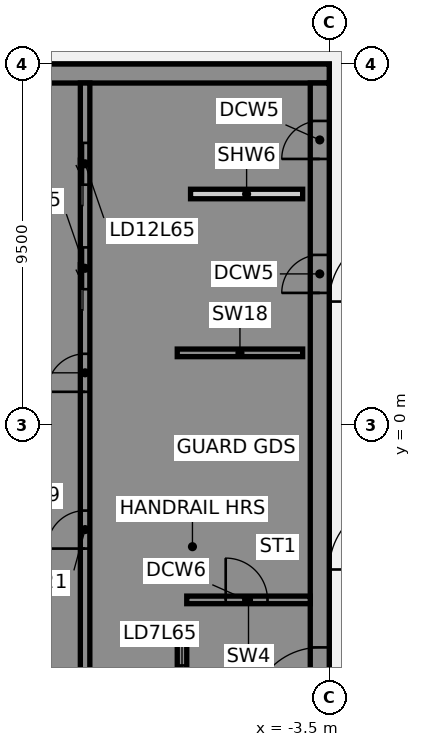
"""IFC4 building model, lengths in metres.
Left out: names, types, materials, properties, quantities, classifications, styles, units other than length and angle.
Written with IfcOpenShell. Run it as: python <this file> out.ifc"""

import sys

from ifc_helpers import new_model, si_unit, direction, frame, frame_2d, origin, place, context, subcontext, project, spatial, polyline, rectangle, outline, extrude, element, fill, save


model = new_model("IFC4")
c1 = context("Model", 3, precision=1e-05, world=origin(), true_north=direction((0.0, 1.0)))
c2 = subcontext(c1, "Body", "Model", "MODEL_VIEW")
j1 = project(units=[si_unit("LENGTHUNIT", "METRE"), si_unit("PLANEANGLEUNIT", "RADIAN")], contexts=[c1])
p1 = place(None, origin())
s1 = spatial("IfcSite", under=j1, at=p1, CompositionType="ELEMENT")
p2 = place(p1, origin())
s2 = spatial("IfcBuilding", under=s1, at=p2, CompositionType="ELEMENT")
p3 = place(p2, frame((0.0, 0.0, 256.8)))
s3 = spatial("IfcBuildingStorey", under=s2, at=p3, CompositionType="ELEMENT", Elevation=256.8)
p4 = place(p3, frame((-16.5, 9.25, 0.0), z_axis=(0.0, 0.0, 1.0), x_axis=(1.0, 0.0, 0.0)))
e1 = element("IfcWall", 1, at=p4, inside=s3, PredefinedType="SHEAR", context=c2, shape_type="SweptSolid", body=[
    extrude(rectangle(XDim=13.0, YDim=0.5, at=frame_2d((6.5, 0.0))), origin(), (0.0, 0.0, 1.0), 3.46),
])
p5 = place(p3, origin())
e2 = element("IfcWall", 2, at=p5, inside=s3, PredefinedType="SHEAR", context=c2, shape_type="SweptSolid", body=[
    extrude(outline(polyline([(-9.8, -5.375), (-9.8, -5.625), (-7.5, -5.625), (-7.25, -5.625), (-7.25, 9.0), (-7.5, 9.0), (-9.8, 9.0), (-9.8, 8.125), (-7.5, 8.125), (-7.5, 5.625), (-9.8, 5.625), (-9.8, 5.375), (-7.5, 5.375), (-7.5, 2.875), (-9.8, 2.875), (-9.8, 2.625), (-7.5, 2.625), (-7.5, -5.375), (-9.8, -5.375)])), origin(), (0.0, 0.0, 1.0), 3.46),
])
p6 = place(p3, origin())
e3 = element("IfcWall", 3, at=p6, inside=s3, PredefinedType="SHEAR", context=c2, shape_type="SweptSolid", body=[
    extrude(outline(polyline([(-7.5, -8.125), (-9.55, -8.125), (-9.55, -5.625), (-9.8, -5.625), (-9.8, -8.125), (-9.8, -9.0), (-7.5, -9.0), (-7.5, -8.125)])), origin(), (0.0, 0.0, 1.0), 3.46),
])
p7 = place(p3, frame((-7.5, 1.9, 0.0), z_axis=(0.0, 0.0, 1.0), x_axis=(1.0, 0.0, 0.0)))
e4 = element("IfcWall", 4, at=p7, inside=s3, PredefinedType="SHEAR", context=c2, shape_type="SweptSolid", body=[
    extrude(rectangle(XDim=3.3, YDim=0.2, at=frame_2d((1.65, 0.0))), origin(), (0.0, 0.0, 1.0), 3.46),
])
p8 = place(p3, frame((-9.925, -9.0, 0.0), z_axis=(0.0, 0.0, 1.0), x_axis=(0.0, 1.0, 0.0)))
e5 = element("IfcWall", 5, at=p8, inside=s3, PredefinedType="SHEAR", context=c2, shape_type="SweptSolid", body=[
    extrude(rectangle(XDim=18.0, YDim=0.25, at=frame_2d((9.0, 0.0))), origin(), (0.0, 0.0, 1.0), 3.46),
])
p9 = place(p8, frame((12.575, 0.0, 0.0)))
e6 = element("IfcOpeningElement", 6, at=p9, cuts=e5, PredefinedType="OPENING", context=c2, shape_type="SweptSolid", body=[
    extrude(rectangle(XDim=1.1, YDim=2.1, at=frame_2d((0.55, 1.05))), frame((0.0, 0.135, 0.0), z_axis=(0.0, -1.0, 0.0), x_axis=(1.0, 0.0, 0.0)), (0.0, 0.0, 1.0), 0.27),
])
p10 = place(p8, frame((15.325, 0.0, 0.0)))
e7 = element("IfcOpeningElement", 7, at=p10, cuts=e5, PredefinedType="OPENING", context=c2, shape_type="SweptSolid", body=[
    extrude(rectangle(XDim=1.1, YDim=2.1, at=frame_2d((0.55, 1.05))), frame((0.0, 0.135, 0.0), z_axis=(0.0, -1.0, 0.0), x_axis=(1.0, 0.0, 0.0)), (0.0, 0.0, 1.0), 0.27),
])
p11 = place(p8, frame((5.75, 0.0, 0.0)))
e8 = element("IfcOpeningElement", 8, at=p11, cuts=e5, PredefinedType="OPENING", context=c2, shape_type="SweptSolid", body=[
    extrude(rectangle(XDim=1.0, YDim=2.1, at=frame_2d((0.5, 1.05))), frame((0.0, 0.135, 0.0), z_axis=(0.0, -1.0, 0.0), x_axis=(1.0, 0.0, 0.0)), (0.0, 0.0, 1.0), 0.27),
])
p12 = place(p8, frame((9.875, 0.0, 0.0)))
e9 = element("IfcOpeningElement", 9, at=p12, cuts=e5, PredefinedType="OPENING", context=c2, shape_type="SweptSolid", body=[
    extrude(rectangle(XDim=1.0, YDim=2.1, at=frame_2d((0.5, 1.05))), frame((0.0, 0.135, 0.0), z_axis=(0.0, -1.0, 0.0), x_axis=(1.0, 0.0, 0.0)), (0.0, 0.0, 1.0), 0.27),
])
p13 = place(p3, frame((-7.375, -8.125, 0.0), z_axis=(0.0, 0.0, 1.0), x_axis=(0.0, 1.0, 0.0)))
e10 = element("IfcWall", 10, at=p13, inside=s3, PredefinedType="SHEAR", context=c2, shape_type="SweptSolid", body=[
    extrude(rectangle(XDim=2.5, YDim=0.25, at=frame_2d((1.25, 0.0))), origin(), (0.0, 0.0, 1.0), 3.46),
])
p14 = place(p13, frame((0.7, 0.0, 0.0)))
e11 = element("IfcOpeningElement", 11, at=p14, cuts=e10, PredefinedType="OPENING", context=c2, shape_type="SweptSolid", body=[
    extrude(rectangle(XDim=1.1, YDim=2.1, at=frame_2d((0.55, 1.05))), frame((0.0, 0.135, 0.0), z_axis=(0.0, -1.0, 0.0), x_axis=(1.0, 0.0, 0.0)), (0.0, 0.0, 1.0), 0.27),
])
p15 = place(p3, frame((-3.75, -9.0, 0.0), z_axis=(0.0, 0.0, 1.0), x_axis=(0.0, 1.0, 0.0)))
e12 = element("IfcWall", 12, at=p15, inside=s3, PredefinedType="SHEAR", context=c2, shape_type="SweptSolid", body=[
    extrude(rectangle(XDim=18.0, YDim=0.5, at=frame_2d((9.0, 0.0))), origin(), (0.0, 0.0, 1.0), 3.46),
])
p16 = place(p15, frame((1.35, 0.0, 0.0)))
e13 = element("IfcOpeningElement", 13, at=p16, cuts=e12, PredefinedType="OPENING", context=c2, shape_type="SweptSolid", body=[
    extrude(rectangle(XDim=1.8, YDim=2.1, at=frame_2d((0.9, 1.05))), frame((0.0, 0.26, 0.0), z_axis=(0.0, -1.0, 0.0), x_axis=(1.0, 0.0, 0.0)), (0.0, 0.0, 1.0), 0.52),
])
p17 = place(p15, frame((12.478, 0.0, 0.0)))
e14 = element("IfcOpeningElement", 14, at=p17, cuts=e12, PredefinedType="OPENING", context=c2, shape_type="SweptSolid", body=[
    extrude(rectangle(XDim=1.0, YDim=2.1, at=frame_2d((0.5, 1.05))), frame((0.0, 0.26, 0.0), z_axis=(0.0, -1.0, 0.0), x_axis=(1.0, 0.0, 0.0)), (0.0, 0.0, 1.0), 0.52),
])
p18 = place(p15, frame((16.002, 0.0, 0.0)))
e15 = element("IfcOpeningElement", 15, at=p18, cuts=e12, PredefinedType="OPENING", context=c2, shape_type="SweptSolid", body=[
    extrude(rectangle(XDim=1.0, YDim=2.1, at=frame_2d((0.5, 1.05))), frame((0.0, 0.26, 0.0), z_axis=(0.0, -1.0, 0.0), x_axis=(1.0, 0.0, 0.0)), (0.0, 0.0, 1.0), 0.52),
])
p19 = place(p3, frame((-7.15, 6.08, 0.0), z_axis=(0.0, 0.0, 1.0), x_axis=(1.0, 0.0, 0.0)))
e16 = element("IfcWall", 16, at=p19, inside=s3, PredefinedType="PARTITIONING", context=c2, shape_type="SweptSolid", body=[
    extrude(rectangle(XDim=2.95, YDim=0.25, at=frame_2d((1.475, 0.0))), origin(), (0.0, 0.0, 1.0), 3.46),
])
p20 = place(p3, frame((-7.25, -4.6, 0.0), z_axis=(0.0, 0.0, 1.0), x_axis=(1.0, 0.0, 0.0)))
e17 = element("IfcWall", 17, at=p20, inside=s3, PredefinedType="SHEAR", context=c2, shape_type="SweptSolid", body=[
    extrude(rectangle(XDim=3.25, YDim=0.2, at=frame_2d((1.625, 0.0))), origin(), (0.0, 0.0, 1.0), 3.46),
])
p21 = place(p20, frame((1.025, 0.0, 0.0)))
e18 = element("IfcOpeningElement", 18, at=p21, cuts=e17, PredefinedType="OPENING", context=c2, shape_type="SweptSolid", body=[
    extrude(rectangle(XDim=1.1, YDim=2.1, at=frame_2d((0.55, 1.05))), frame((0.0, 0.11, 0.0), z_axis=(0.0, -1.0, 0.0), x_axis=(1.0, 0.0, 0.0)), (0.0, 0.0, 1.0), 0.22),
])
p22 = place(p16, origin())
e19 = element("IfcDoor", 19, at=p22, inside=s3, OperationType="SINGLE_SWING_LEFT", PredefinedType="DOOR", context=c2, shape_type="SweptSolid", body=[
    extrude(rectangle(XDim=1.8, YDim=2.1, at=frame_2d((0.9, 1.05))), frame((0.0, 0.025, 0.0), z_axis=(0.0, -1.0, 0.0), x_axis=(1.0, 0.0, 0.0)), (0.0, 0.0, 1.0), 0.05),
])
fill(e13, e19)
p23 = place(p17, origin())
e20 = element("IfcDoor", 20, at=p23, inside=s3, OperationType="SINGLE_SWING_LEFT", PredefinedType="DOOR", context=c2, shape_type="SweptSolid", body=[
    extrude(rectangle(XDim=1.0, YDim=2.1, at=frame_2d((0.5, 1.05))), frame((0.0, 0.225, 0.0), z_axis=(0.0, -1.0, 0.0), x_axis=(1.0, 0.0, 0.0)), (0.0, 0.0, 1.0), 0.05),
])
fill(e14, e20)
p24 = place(p18, origin())
e21 = element("IfcDoor", 21, at=p24, inside=s3, OperationType="SINGLE_SWING_LEFT", PredefinedType="DOOR", context=c2, shape_type="SweptSolid", body=[
    extrude(rectangle(XDim=1.0, YDim=2.1, at=frame_2d((0.5, 1.05))), frame((0.0, 0.225, 0.0), z_axis=(0.0, -1.0, 0.0), x_axis=(1.0, 0.0, 0.0)), (0.0, 0.0, 1.0), 0.05),
])
fill(e15, e21)
p25 = place(p21, origin())
e22 = element("IfcDoor", 22, at=p25, inside=s3, OperationType="SINGLE_SWING_LEFT", PredefinedType="DOOR", context=c2, shape_type="SweptSolid", body=[
    extrude(rectangle(XDim=1.1, YDim=2.1, at=frame_2d((0.55, 1.05))), frame((0.0, 0.025, 0.0), z_axis=(0.0, -1.0, 0.0), x_axis=(1.0, 0.0, 0.0)), (0.0, 0.0, 1.0), 0.05),
])
fill(e18, e22)
p26 = place(p14, origin())
e23 = element("IfcDoor", 23, at=p26, inside=s3, OperationType="SLIDING_TO_LEFT", PredefinedType="DOOR", context=c2, shape_type="SweptSolid", body=[
    extrude(rectangle(XDim=1.1, YDim=2.1, at=frame_2d((0.55, 1.05))), frame((0.0, 0.025, 0.0), z_axis=(0.0, -1.0, 0.0), x_axis=(1.0, 0.0, 0.0)), (0.0, 0.0, 1.0), 0.05),
])
fill(e11, e23)
p27 = place(p9, origin())
e24 = element("IfcDoor", 24, at=p27, inside=s3, OperationType="SLIDING_TO_LEFT", PredefinedType="DOOR", context=c2, shape_type="SweptSolid", body=[
    extrude(rectangle(XDim=1.1, YDim=2.1, at=frame_2d((0.55, 1.05))), frame((0.0, 0.025, 0.0), z_axis=(0.0, -1.0, 0.0), x_axis=(1.0, 0.0, 0.0)), (0.0, 0.0, 1.0), 0.05),
])
fill(e6, e24)
p28 = place(p10, origin())
e25 = element("IfcDoor", 25, at=p28, inside=s3, OperationType="SLIDING_TO_LEFT", PredefinedType="DOOR", context=c2, shape_type="SweptSolid", body=[
    extrude(rectangle(XDim=1.1, YDim=2.1, at=frame_2d((0.55, 1.05))), frame((0.0, 0.025, 0.0), z_axis=(0.0, -1.0, 0.0), x_axis=(1.0, 0.0, 0.0)), (0.0, 0.0, 1.0), 0.05),
])
fill(e7, e25)
p29 = place(p11, origin())
e26 = element("IfcDoor", 26, at=p29, inside=s3, OperationType="SINGLE_SWING_LEFT", PredefinedType="DOOR", context=c2, shape_type="SweptSolid", body=[
    extrude(rectangle(XDim=1.0, YDim=2.1, at=frame_2d((0.5, 1.05))), frame((0.0, 0.025, 0.0), z_axis=(0.0, -1.0, 0.0), x_axis=(1.0, 0.0, 0.0)), (0.0, 0.0, 1.0), 0.05),
])
fill(e8, e26)
p30 = place(p12, origin())
e27 = element("IfcDoor", 27, at=p30, inside=s3, OperationType="SINGLE_SWING_LEFT", PredefinedType="DOOR", context=c2, shape_type="SweptSolid", body=[
    extrude(rectangle(XDim=1.0, YDim=2.1, at=frame_2d((0.5, 1.05))), frame((0.0, 0.025, 0.0), z_axis=(0.0, -1.0, 0.0), x_axis=(1.0, 0.0, 0.0)), (0.0, 0.0, 1.0), 0.05),
])
fill(e9, e27)
save(model, sys.argv[1])
